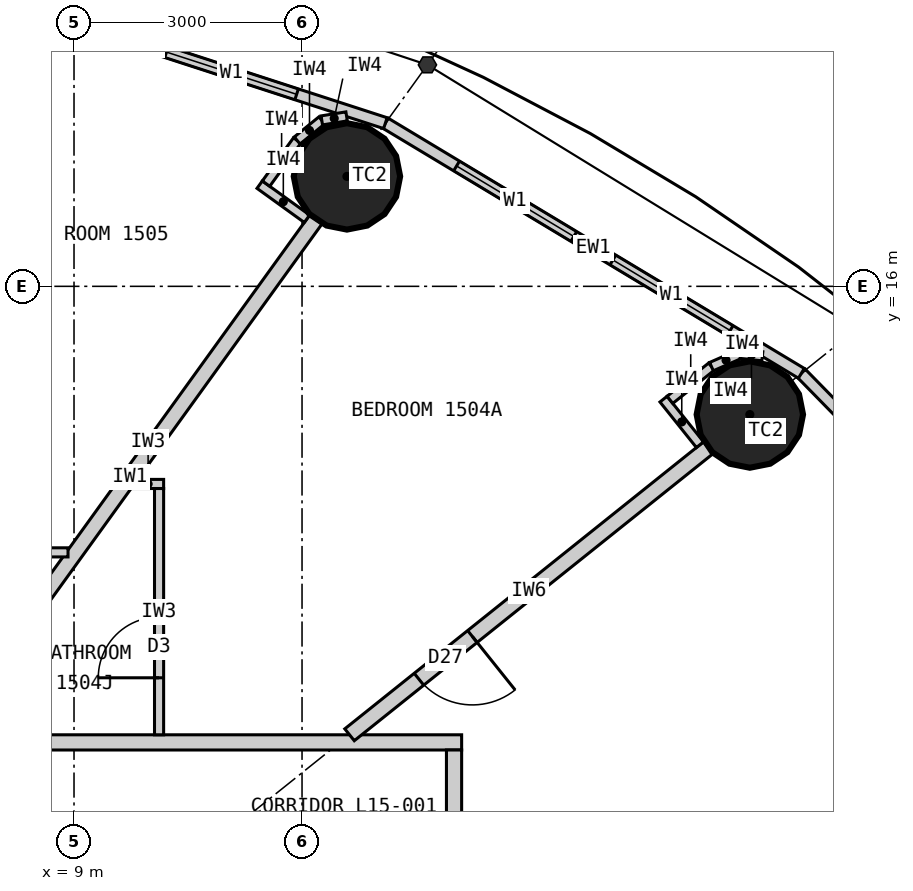
"""IFC4 building model, lengths in metres.
Left out: names, types, materials, properties, quantities, classifications, styles, units other than length and angle.
Written with IfcOpenShell. Run it as: python <this file> out.ifc"""

import sys

from ifc_helpers import new_model, si_unit, direction, frame, frame_2d, origin, origin_2d, place, context, subcontext, project, spatial, rectangle, circle, extrude, element, fill, save


model = new_model("IFC4")
c1 = context("Model", 3, precision=1e-05, world=origin(), true_north=direction((0.0, 1.0)))
c2 = subcontext(c1, "Body", "Model", "MODEL_VIEW")
j1 = project(units=[si_unit("LENGTHUNIT", "METRE"), si_unit("PLANEANGLEUNIT", "RADIAN")], contexts=[c1])
p1 = place(None, origin())
s1 = spatial("IfcSite", under=j1, at=p1, CompositionType="ELEMENT")
p2 = place(p1, origin())
s2 = spatial("IfcBuilding", under=s1, at=p2, CompositionType="ELEMENT")
p3 = place(p2, frame((0.0, 0.0, 63.9)))
s3 = spatial("IfcBuildingStorey", under=s2, at=p3, CompositionType="ELEMENT", Elevation=63.9)
for number, where, z_axis, x_axis in (
    (1, (17.892, 14.313, 0.0), (0.0, 0.0, 1.0), (1.0, 0.0, 0.0)),
    (2, (12.591, 17.447, 0.0), (0.0, 0.0, 1.0), (1.0, 0.0, 0.0)),
):
    element("IfcColumn", number, at=place(p3, frame(where, z_axis=z_axis, x_axis=x_axis)), inside=s3, PredefinedType="COLUMN", context=c2, shape_type="SweptSolid", body=[
        extrude(circle(Radius=0.7, at=origin_2d()), origin(), (0.0, 0.0, 1.0), 3.3),
    ])
p4 = place(p3, frame((22.803, 10.532, 0.0), z_axis=(0.0, 0.0, 1.0), x_axis=(-0.699602905915, 0.714531856557, 0.0)))
e3 = element("IfcWall", 3, at=p4, inside=s3, PredefinedType="ELEMENTEDWALL", context=c2, shape_type="SweptSolid", body=[
    extrude(rectangle(XDim=6.051, YDim=0.15, at=frame_2d((3.025, 0.0))), origin(), (0.0, 0.0, 1.0), 3.12),
])
p5 = place(p4, frame((0.926, 0.0, 0.9)))
e4 = element("IfcOpeningElement", 4, at=p5, cuts=e3, PredefinedType="OPENING", context=c2, shape_type="SweptSolid", body=[
    extrude(rectangle(XDim=1.8, YDim=1.9, at=frame_2d((0.9, 0.95))), frame((0.0, 0.085, 0.0), z_axis=(0.0, -1.0, 0.0), x_axis=(1.0, 0.0, 0.0)), (0.0, 0.0, 1.0), 0.17),
])
p6 = place(p4, frame((3.325, 0.0, 0.9)))
e5 = element("IfcOpeningElement", 5, at=p6, cuts=e3, PredefinedType="OPENING", context=c2, shape_type="SweptSolid", body=[
    extrude(rectangle(XDim=1.8, YDim=1.9, at=frame_2d((0.9, 0.95))), frame((0.0, 0.085, 0.0), z_axis=(0.0, -1.0, 0.0), x_axis=(1.0, 0.0, 0.0)), (0.0, 0.0, 1.0), 0.17),
])
p7 = place(p3, frame((18.57, 14.856, 0.0), z_axis=(0.0, 0.0, 1.0), x_axis=(-0.856983180864, 0.515344377787, 0.0)))
e6 = element("IfcWall", 6, at=p7, inside=s3, PredefinedType="ELEMENTEDWALL", context=c2, shape_type="SweptSolid", body=[
    extrude(rectangle(XDim=6.386, YDim=0.15, at=frame_2d((3.193, 0.0))), origin(), (0.0, 0.0, 1.0), 3.12),
])
p8 = place(p7, frame((1.093, 0.0, 0.9)))
e7 = element("IfcOpeningElement", 7, at=p8, cuts=e6, PredefinedType="OPENING", context=c2, shape_type="SweptSolid", body=[
    extrude(rectangle(XDim=1.8, YDim=1.9, at=frame_2d((0.9, 0.95))), frame((0.0, 0.085, 0.0), z_axis=(0.0, -1.0, 0.0), x_axis=(1.0, 0.0, 0.0)), (0.0, 0.0, 1.0), 0.17),
])
p9 = place(p7, frame((3.493, 0.0, 0.9)))
e8 = element("IfcOpeningElement", 8, at=p9, cuts=e6, PredefinedType="OPENING", context=c2, shape_type="SweptSolid", body=[
    extrude(rectangle(XDim=1.8, YDim=1.9, at=frame_2d((0.9, 0.95))), frame((0.0, 0.085, 0.0), z_axis=(0.0, -1.0, 0.0), x_axis=(1.0, 0.0, 0.0)), (0.0, 0.0, 1.0), 0.17),
])
p10 = place(p3, frame((13.096, 18.147, 0.0), z_axis=(0.0, 0.0, 1.0), x_axis=(-0.951137534625, 0.308767534285, 0.0)))
e9 = element("IfcWall", 9, at=p10, inside=s3, PredefinedType="ELEMENTEDWALL", context=c2, shape_type="SweptSolid", body=[
    extrude(rectangle(XDim=6.655, YDim=0.15, at=frame_2d((3.328, 0.0))), origin(), (0.0, 0.0, 1.0), 3.12),
])
p11 = place(p10, frame((1.228, 0.0, 0.9)))
e10 = element("IfcOpeningElement", 10, at=p11, cuts=e9, PredefinedType="OPENING", context=c2, shape_type="SweptSolid", body=[
    extrude(rectangle(XDim=1.8, YDim=1.9, at=frame_2d((0.9, 0.95))), frame((0.0, 0.085, 0.0), z_axis=(0.0, -1.0, 0.0), x_axis=(1.0, 0.0, 0.0)), (0.0, 0.0, 1.0), 0.17),
])
p12 = place(p10, frame((3.628, 0.0, 0.9)))
e11 = element("IfcOpeningElement", 11, at=p12, cuts=e9, PredefinedType="OPENING", context=c2, shape_type="SweptSolid", body=[
    extrude(rectangle(XDim=1.8, YDim=1.9, at=frame_2d((0.9, 0.95))), frame((0.0, 0.085, 0.0), z_axis=(0.0, -1.0, 0.0), x_axis=(1.0, 0.0, 0.0)), (0.0, 0.0, 1.0), 0.17),
])
p13 = place(p3, frame((-14.1, 10.0, 0.0), z_axis=(0.0, 0.0, 1.0), x_axis=(1.0, 0.0, 0.0)))
e12 = element("IfcWall", 12, at=p13, inside=s3, PredefinedType="PARTITIONING", context=c2, shape_type="SweptSolid", body=[
    extrude(rectangle(XDim=28.2, YDim=0.2, at=frame_2d((14.1, 0.0))), origin(), (0.0, 0.0, 1.0), 3.12),
])
p14 = place(p13, frame((18.529, 0.0, 0.0)))
e13 = element("IfcOpeningElement", 13, at=p14, cuts=e12, PredefinedType="OPENING", context=c2, shape_type="SweptSolid", body=[
    extrude(rectangle(XDim=1.0, YDim=2.2, at=frame_2d((0.5, 1.1))), frame((0.0, 0.11, 0.0), z_axis=(0.0, -1.0, 0.0), x_axis=(1.0, 0.0, 0.0)), (0.0, 0.0, 1.0), 0.22),
])
p15 = place(p13, frame((14.623, 0.0, 0.0)))
e14 = element("IfcOpeningElement", 14, at=p15, cuts=e12, PredefinedType="OPENING", context=c2, shape_type="SweptSolid", body=[
    extrude(rectangle(XDim=1.0, YDim=2.2, at=frame_2d((0.5, 1.1))), frame((0.0, 0.11, 0.0), z_axis=(0.0, -1.0, 0.0), x_axis=(1.0, 0.0, 0.0)), (0.0, 0.0, 1.0), 0.22),
])
p16 = place(p13, frame((11.24, 0.0, 0.0)))
e15 = element("IfcOpeningElement", 15, at=p16, cuts=e12, PredefinedType="OPENING", context=c2, shape_type="SweptSolid", body=[
    extrude(rectangle(XDim=1.0, YDim=2.2, at=frame_2d((0.5, 1.1))), frame((0.0, 0.11, 0.0), z_axis=(0.0, -1.0, 0.0), x_axis=(1.0, 0.0, 0.0)), (0.0, 0.0, 1.0), 0.22),
])
p17 = place(p13, frame((8.671, 0.0, 0.0)))
e16 = element("IfcOpeningElement", 16, at=p17, cuts=e12, PredefinedType="OPENING", context=c2, shape_type="SweptSolid", body=[
    extrude(rectangle(XDim=1.0, YDim=2.2, at=frame_2d((0.5, 1.1))), frame((0.0, 0.11, 0.0), z_axis=(0.0, -1.0, 0.0), x_axis=(1.0, 0.0, 0.0)), (0.0, 0.0, 1.0), 0.22),
])
p18 = place(p13, frame((2.801, 0.0, 0.0)))
e17 = element("IfcOpeningElement", 17, at=p18, cuts=e12, PredefinedType="OPENING", context=c2, shape_type="SweptSolid", body=[
    extrude(rectangle(XDim=1.0, YDim=2.2, at=frame_2d((0.5, 1.1))), frame((0.0, 0.11, 0.0), z_axis=(0.0, -1.0, 0.0), x_axis=(1.0, 0.0, 0.0)), (0.0, 0.0, 1.0), 0.22),
])
p19 = place(p3, frame((14.0, -9.9, 0.0), z_axis=(0.0, 0.0, 1.0), x_axis=(0.0, 1.0, 0.0)))
e18 = element("IfcWall", 18, at=p19, inside=s3, PredefinedType="PARTITIONING", context=c2, shape_type="SweptSolid", body=[
    extrude(rectangle(XDim=19.8, YDim=0.2, at=frame_2d((9.9, 0.0))), origin(), (0.0, 0.0, 1.0), 3.12),
])
p20 = place(p19, frame((0.103, 0.0, 0.0)))
e19 = element("IfcOpeningElement", 19, at=p20, cuts=e18, PredefinedType="OPENING", context=c2, shape_type="SweptSolid", body=[
    extrude(rectangle(XDim=1.0, YDim=2.2, at=frame_2d((0.5, 1.1))), frame((0.0, 0.11, 0.0), z_axis=(0.0, -1.0, 0.0), x_axis=(1.0, 0.0, 0.0)), (0.0, 0.0, 1.0), 0.22),
])
p21 = place(p19, frame((5.248, 0.0, 0.0)))
e20 = element("IfcOpeningElement", 20, at=p21, cuts=e18, PredefinedType="OPENING", context=c2, shape_type="SweptSolid", body=[
    extrude(rectangle(XDim=1.0, YDim=2.2, at=frame_2d((0.5, 1.1))), frame((0.0, 0.11, 0.0), z_axis=(0.0, -1.0, 0.0), x_axis=(1.0, 0.0, 0.0)), (0.0, 0.0, 1.0), 0.22),
])
p22 = place(p19, frame((8.438, 0.0, 0.0)))
e21 = element("IfcOpeningElement", 21, at=p22, cuts=e18, PredefinedType="OPENING", context=c2, shape_type="SweptSolid", body=[
    extrude(rectangle(XDim=1.0, YDim=2.2, at=frame_2d((0.5, 1.1))), frame((0.0, 0.11, 0.0), z_axis=(0.0, -1.0, 0.0), x_axis=(1.0, 0.0, 0.0)), (0.0, 0.0, 1.0), 0.22),
])
p23 = place(p19, frame((14.532, 0.0, 0.0)))
e22 = element("IfcOpeningElement", 22, at=p23, cuts=e18, PredefinedType="OPENING", context=c2, shape_type="SweptSolid", body=[
    extrude(rectangle(XDim=1.0, YDim=2.2, at=frame_2d((0.5, 1.1))), frame((0.0, 0.11, 0.0), z_axis=(0.0, -1.0, 0.0), x_axis=(1.0, 0.0, 0.0)), (0.0, 0.0, 1.0), 0.22),
])
p24 = place(p3, frame((12.625, 10.1, 0.0), z_axis=(0.0, 0.0, 1.0), x_axis=(0.780892451574, 0.624665493744, 0.0)))
e23 = element("IfcWall", 23, at=p24, inside=s3, PredefinedType="PARTITIONING", context=c2, shape_type="SweptSolid", body=[
    extrude(rectangle(XDim=6.045, YDim=0.2, at=frame_2d((3.022, 0.0))), origin(), (0.0, 0.0, 1.0), 2.32),
])
p25 = place(p24, frame((1.17, 0.0, 0.0)))
e24 = element("IfcOpeningElement", 24, at=p25, cuts=e23, PredefinedType="OPENING", context=c2, shape_type="SweptSolid", body=[
    extrude(rectangle(XDim=0.9, YDim=2.1, at=frame_2d((0.45, 1.05))), frame((0.0, 0.11, 0.0), z_axis=(0.0, -1.0, 0.0), x_axis=(1.0, 0.0, 0.0)), (0.0, 0.0, 1.0), 0.22),
])
p26 = place(p3, frame((7.289, 10.1, 0.0), z_axis=(0.0, 0.0, 1.0), x_axis=(0.585198353053, 0.810890182197, 0.0)))
e25 = element("IfcWall", 25, at=p26, inside=s3, PredefinedType="PARTITIONING", context=c2, shape_type="SweptSolid", body=[
    extrude(rectangle(XDim=8.36, YDim=0.2, at=frame_2d((4.18, 0.0))), origin(), (0.0, 0.0, 1.0), 2.32),
])
p27 = place(p3, frame((9.771, 13.4, 0.0), z_axis=(0.0, 0.0, 1.0), x_axis=(1.0, 0.0, 0.0)))
e26 = element("IfcWall", 26, at=p27, inside=s3, PredefinedType="PARTITIONING", context=c2, shape_type="SweptSolid", body=[
    extrude(rectangle(XDim=0.408, YDim=0.12, at=frame_2d((0.204, 0.0))), origin(), (0.0, 0.0, 1.0), 3.12),
])
p28 = place(p3, frame((10.119, 10.1, 0.0), z_axis=(0.0, 0.0, 1.0), x_axis=(0.0, 1.0, 0.0)))
e27 = element("IfcWall", 27, at=p28, inside=s3, PredefinedType="PARTITIONING", context=c2, shape_type="SweptSolid", body=[
    extrude(rectangle(XDim=3.24, YDim=0.12, at=frame_2d((1.62, 0.0))), origin(), (0.0, 0.0, 1.0), 3.12),
])
p29 = place(p28, frame((0.75, 0.0, 0.0)))
e28 = element("IfcOpeningElement", 28, at=p29, cuts=e27, PredefinedType="OPENING", context=c2, shape_type="SweptSolid", body=[
    extrude(rectangle(XDim=0.8, YDim=2.1, at=frame_2d((0.4, 1.05))), frame((0.0, 0.07, 0.0), z_axis=(0.0, -1.0, 0.0), x_axis=(1.0, 0.0, 0.0)), (0.0, 0.0, 1.0), 0.14),
])
p30 = place(p3, frame((8.921, 12.5, 0.0), z_axis=(0.0, 0.0, 1.0), x_axis=(-1.0, 0.0, 0.0)))
e29 = element("IfcWall", 29, at=p30, inside=s3, PredefinedType="PARTITIONING", context=c2, shape_type="SweptSolid", body=[
    extrude(rectangle(XDim=3.372, YDim=0.12, at=frame_2d((1.686, 0.0))), origin(), (0.0, 0.0, 1.0), 3.12),
])
p31 = place(p3, frame((17.236, 13.917, 0.0), z_axis=(0.0, 0.0, 1.0), x_axis=(-0.624695047554, 0.780868809443, 0.0)))
e30 = element("IfcWall", 30, at=p31, inside=s3, PredefinedType="PARTITIONING", context=c2, shape_type="SweptSolid", body=[
    extrude(rectangle(XDim=0.768, YDim=0.12, at=frame_2d((0.384, 0.0))), origin(), (0.0, 0.0, 1.0), 3.12),
])
p32 = place(p3, frame((16.841, 14.507, 0.0), z_axis=(0.0, 0.0, 1.0), x_axis=(0.780902834923, 0.62465251333, 0.0)))
e31 = element("IfcWall", 31, at=p32, inside=s3, PredefinedType="PARTITIONING", context=c2, shape_type="SweptSolid", body=[
    extrude(rectangle(XDim=0.7, YDim=0.12, at=frame_2d((0.35, 0.0))), origin(), (0.0, 0.0, 1.0), 3.12),
])
p33 = place(p3, frame((17.387, 14.944, 0.0), z_axis=(0.0, 0.0, 1.0), x_axis=(0.916036698064, 0.401094462441, 0.0)))
e32 = element("IfcWall", 32, at=p33, inside=s3, PredefinedType="PARTITIONING", context=c2, shape_type="SweptSolid", body=[
    extrude(rectangle(XDim=0.418, YDim=0.12, at=frame_2d((0.209, 0.0))), origin(), (0.0, 0.0, 1.0), 3.12),
])
p34 = place(p3, frame((17.77, 15.112, 0.0), z_axis=(0.0, 0.0, 1.0), x_axis=(0.993904401174, -0.110245368731, 0.0)))
e33 = element("IfcWall", 33, at=p34, inside=s3, PredefinedType="PARTITIONING", context=c2, shape_type="SweptSolid", body=[
    extrude(rectangle(XDim=0.288, YDim=0.12, at=frame_2d((0.144, 0.0))), origin(), (0.0, 0.0, 1.0), 3.12),
])
p35 = place(p3, frame((12.065, 16.889, 0.0), z_axis=(0.0, 0.0, 1.0), x_axis=(-0.810821798253, 0.585293098778, 0.0)))
e34 = element("IfcWall", 34, at=p35, inside=s3, PredefinedType="PARTITIONING", context=c2, shape_type="SweptSolid", body=[
    extrude(rectangle(XDim=0.768, YDim=0.12, at=frame_2d((0.384, 0.0))), origin(), (0.0, 0.0, 1.0), 3.12),
])
p36 = place(p3, frame((11.526, 17.351, 0.0), z_axis=(0.0, 0.0, 1.0), x_axis=(0.585223113993, 0.810872312296, 0.0)))
e35 = element("IfcWall", 35, at=p36, inside=s3, PredefinedType="PARTITIONING", context=c2, shape_type="SweptSolid", body=[
    extrude(rectangle(XDim=0.7, YDim=0.12, at=frame_2d((0.35, 0.0))), origin(), (0.0, 0.0, 1.0), 3.12),
])
p37 = place(p3, frame((11.936, 17.919, 0.0), z_axis=(0.0, 0.0, 1.0), x_axis=(0.775023088441, 0.631932917629, 0.0)))
e36 = element("IfcWall", 36, at=p37, inside=s3, PredefinedType="PARTITIONING", context=c2, shape_type="SweptSolid", body=[
    extrude(rectangle(XDim=0.418, YDim=0.12, at=frame_2d((0.209, 0.0))), origin(), (0.0, 0.0, 1.0), 3.12),
])
p38 = place(p3, frame((12.26, 18.183, 0.0), z_axis=(0.0, 0.0, 1.0), x_axis=(0.987218661664, 0.159371622511, 0.0)))
e37 = element("IfcWall", 37, at=p38, inside=s3, PredefinedType="PARTITIONING", context=c2, shape_type="SweptSolid", body=[
    extrude(rectangle(XDim=0.331, YDim=0.12, at=frame_2d((0.166, 0.0))), origin(), (0.0, 0.0, 1.0), 3.12),
])
p39 = place(p8, origin())
e38 = element("IfcWindow", 38, at=p39, inside=s3, PartitioningType="SINGLE_PANEL", PredefinedType="WINDOW", context=c2, shape_type="SweptSolid", body=[
    extrude(rectangle(XDim=1.8, YDim=1.9, at=frame_2d((0.9, 0.95))), frame((0.0, 0.03, 0.0), z_axis=(0.0, -1.0, 0.0), x_axis=(1.0, 0.0, 0.0)), (0.0, 0.0, 1.0), 0.06),
])
fill(e7, e38)
p40 = place(p9, origin())
e39 = element("IfcWindow", 39, at=p40, inside=s3, PartitioningType="SINGLE_PANEL", PredefinedType="WINDOW", context=c2, shape_type="SweptSolid", body=[
    extrude(rectangle(XDim=1.8, YDim=1.9, at=frame_2d((0.9, 0.95))), frame((0.0, 0.03, 0.0), z_axis=(0.0, -1.0, 0.0), x_axis=(1.0, 0.0, 0.0)), (0.0, 0.0, 1.0), 0.06),
])
fill(e8, e39)
p41 = place(p11, origin())
e40 = element("IfcWindow", 40, at=p41, inside=s3, PartitioningType="SINGLE_PANEL", PredefinedType="WINDOW", context=c2, shape_type="SweptSolid", body=[
    extrude(rectangle(XDim=1.8, YDim=1.9, at=frame_2d((0.9, 0.95))), frame((0.0, 0.03, 0.0), z_axis=(0.0, -1.0, 0.0), x_axis=(1.0, 0.0, 0.0)), (0.0, 0.0, 1.0), 0.06),
])
fill(e10, e40)
p42 = place(p29, origin())
e41 = element("IfcDoor", 41, at=p42, inside=s3, OperationType="SINGLE_SWING_LEFT", PredefinedType="DOOR", context=c2, shape_type="SweptSolid", body=[
    extrude(rectangle(XDim=0.8, YDim=2.1, at=frame_2d((0.4, 1.05))), frame((0.0, 0.025, 0.0), z_axis=(0.0, -1.0, 0.0), x_axis=(1.0, 0.0, 0.0)), (0.0, 0.0, 1.0), 0.05),
])
fill(e28, e41)
p43 = place(p25, origin())
e42 = element("IfcDoor", 42, at=p43, inside=s3, OperationType="SINGLE_SWING_RIGHT", PredefinedType="DOOR", context=c2, shape_type="SweptSolid", body=[
    extrude(rectangle(XDim=0.9, YDim=2.1, at=frame_2d((0.45, 1.05))), frame((0.0, 0.025, 0.0), z_axis=(0.0, -1.0, 0.0), x_axis=(1.0, 0.0, 0.0)), (0.0, 0.0, 1.0), 0.05),
])
fill(e24, e42)
save(model, sys.argv[1])
